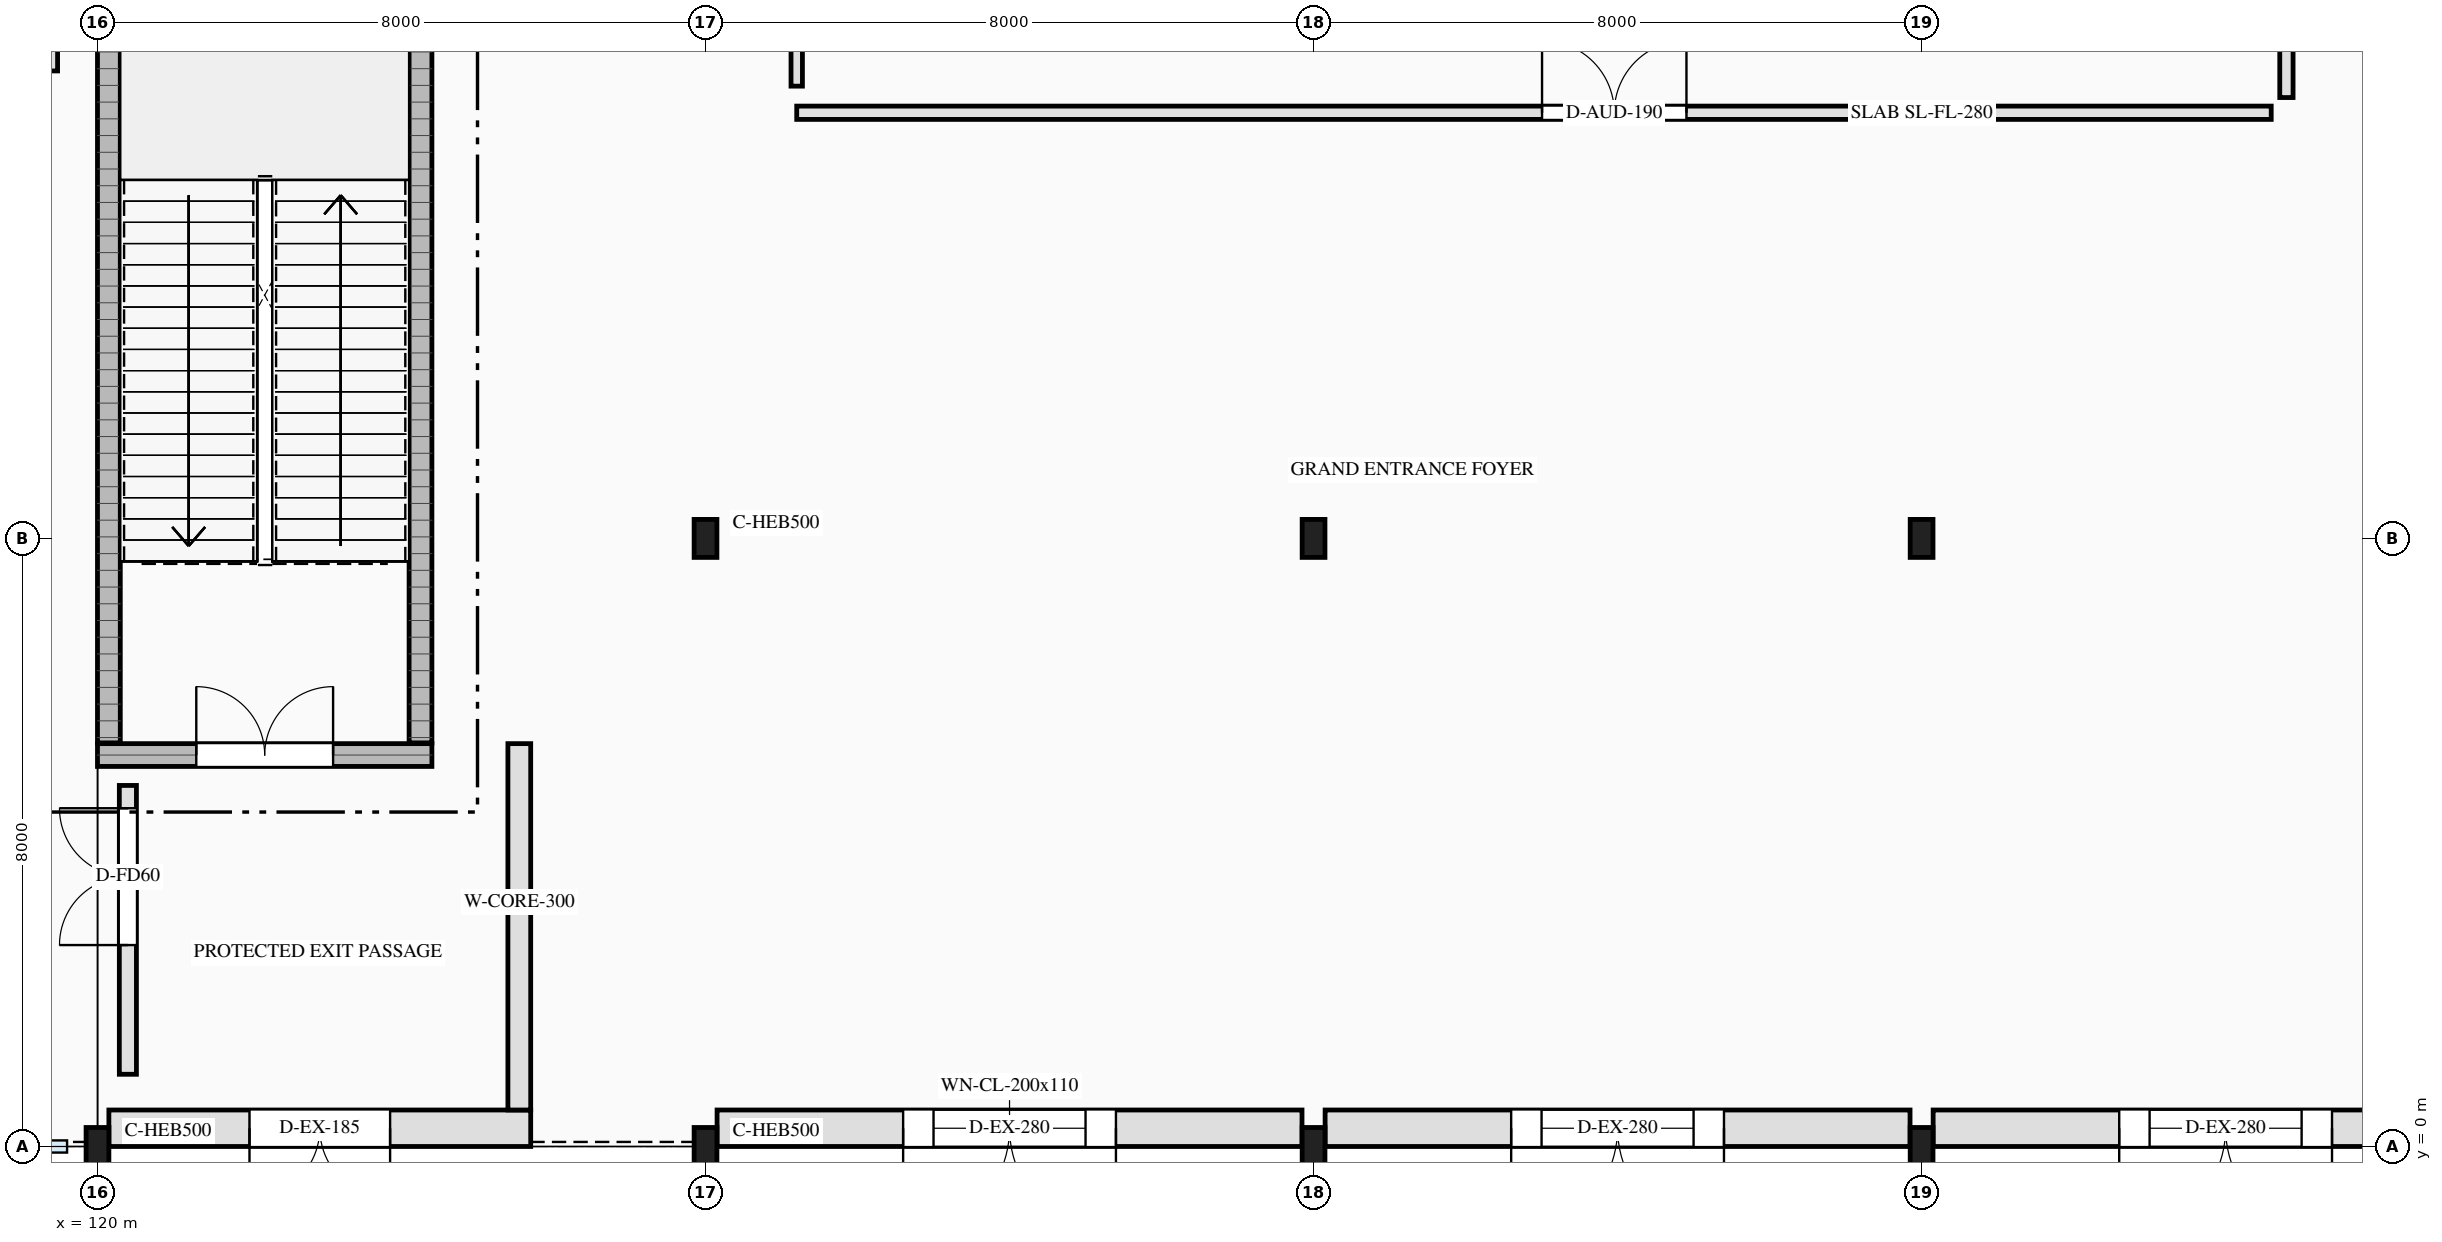
"""IFC4 building model, lengths in metres.
Left out: names, types, materials, properties, quantities, classifications, styles, units other than length and angle.
Written with IfcOpenShell. Run it as: python <this file> out.ifc"""

import sys

from ifc_helpers import new_model, si_unit, direction, frame, frame_2d, origin, origin_2d, place, context, subcontext, project, spatial, rectangle, i_section, extrude, element, fill, save


model = new_model("IFC4")
c1 = context("Model", 3, precision=1e-05, world=origin(), true_north=direction((0.0, 1.0)))
c2 = subcontext(c1, "Body", "Model", "MODEL_VIEW")
j1 = project(units=[si_unit("LENGTHUNIT", "METRE"), si_unit("PLANEANGLEUNIT", "RADIAN")], contexts=[c1])
p1 = place(None, origin())
s1 = spatial("IfcSite", under=j1, at=p1, CompositionType="ELEMENT")
p2 = place(p1, origin())
s2 = spatial("IfcBuilding", under=s1, at=p2, CompositionType="ELEMENT")
p3 = place(p2, origin())
s3 = spatial("IfcBuildingStorey", under=s2, at=p3, CompositionType="ELEMENT", Elevation=0.0)
p4 = place(p3, frame((120.0, 5.15, 0.0), z_axis=(0.0, 0.0, 1.0), x_axis=(1.0, 0.0, 0.0)))
e1 = element("IfcWall", 1, at=p4, inside=s3, PredefinedType="SHEAR", context=c2, shape_type="SweptSolid", body=[
    extrude(rectangle(XDim=4.4, YDim=0.3, at=frame_2d((2.2, 0.0))), origin(), (0.0, 0.0, 1.0), 5.4),
])
p5 = place(p4, frame((1.3, 0.0, 0.0)))
e2 = element("IfcOpeningElement", 2, at=p5, cuts=e1, PredefinedType="OPENING", context=c2, shape_type="SweptSolid", body=[
    extrude(rectangle(XDim=1.8, YDim=2.2, at=frame_2d((0.9, 1.1))), frame((0.0, 0.16, 0.0), z_axis=(0.0, -1.0, 0.0), x_axis=(1.0, 0.0, 0.0)), (0.0, 0.0, 1.0), 0.32),
])
for number, where, z_axis, x_axis in (
    (3, (120.15, 5.31, 0.0), (0.0, 0.0, 1.0), (0.0, 1.0, 0.0)),
    (4, (124.25, 5.31, 0.0), (0.0, 0.0, 1.0), (0.0, 1.0, 0.0)),
):
    element("IfcWall", number, at=place(p3, frame(where, z_axis=z_axis, x_axis=x_axis)), inside=s3, PredefinedType="SHEAR", context=c2, shape_type="SweptSolid", body=[
        extrude(rectangle(XDim=9.38, YDim=0.3, at=frame_2d((4.69, 0.0))), origin(), (0.0, 0.0, 1.0), 5.4),
    ])
for number, where, z_axis, x_axis in (
    (5, (120.0, 0.0, 0.0), (0.0, 0.0, 1.0), (1.0, 0.0, 0.0)),
    (6, (128.0, 0.0, 0.0), (0.0, 0.0, 1.0), (1.0, 0.0, 0.0)),
    (7, (128.0, 8.0, 0.0), (0.0, 0.0, 1.0), (1.0, 0.0, 0.0)),
    (8, (136.0, 0.0, 0.0), (0.0, 0.0, 1.0), (1.0, 0.0, 0.0)),
    (9, (136.0, 8.0, 0.0), (0.0, 0.0, 1.0), (1.0, 0.0, 0.0)),
    (10, (144.0, 0.0, 0.0), (0.0, 0.0, 1.0), (1.0, 0.0, 0.0)),
    (11, (144.0, 8.0, 0.0), (0.0, 0.0, 1.0), (1.0, 0.0, 0.0)),
):
    element("IfcColumn", number, at=place(p3, frame(where, z_axis=z_axis, x_axis=x_axis)), inside=s3, PredefinedType="COLUMN", context=c2, shape_type="SweptSolid", body=[
        extrude(i_section(OverallWidth=0.3, OverallDepth=0.5, WebThickness=0.014, FlangeThickness=0.028, FilletRadius=0.027, at=origin_2d()), origin(), (0.0, 0.0, 1.0), 5.4),
    ])
p6 = place(p3, frame((125.7, 0.24, 0.0), z_axis=(0.0, 0.0, 1.0), x_axis=(-1.0, 0.0, 0.0)))
e12 = element("IfcWall", 12, at=p6, inside=s3, PredefinedType="SOLIDWALL", context=c2, shape_type="SweptSolid", body=[
    extrude(rectangle(XDim=5.55, YDim=0.48, at=frame_2d((2.775, 0.0))), origin(), (0.0, 0.0, 1.0), 4.815),
])
p7 = place(p6, frame((1.85, 0.0, 0.0)))
e13 = element("IfcOpeningElement", 13, at=p7, cuts=e12, PredefinedType="OPENING", context=c2, shape_type="SweptSolid", body=[
    extrude(rectangle(XDim=1.85, YDim=2.3, at=frame_2d((0.925, 1.15))), frame((0.0, 0.25, 0.0), z_axis=(0.0, -1.0, 0.0), x_axis=(1.0, 0.0, 0.0)), (0.0, 0.0, 1.0), 0.5),
])
p8 = place(p3, frame((125.55, 0.48, 0.0), z_axis=(0.0, 0.0, 1.0), x_axis=(0.0, 1.0, 0.0)))
e14 = element("IfcWall", 14, at=p8, inside=s3, PredefinedType="SHEAR", context=c2, shape_type="SweptSolid", body=[
    extrude(rectangle(XDim=4.82, YDim=0.3, at=frame_2d((2.41, 0.0))), origin(), (0.0, 0.0, 1.0), 5.16),
])
p9 = place(p3, frame((135.848, 0.24, 0.0), z_axis=(0.0, 0.0, 1.0), x_axis=(-1.0, 0.0, 0.0)))
e15 = element("IfcWall", 15, at=p9, inside=s3, PredefinedType="SOLIDWALL", context=c2, shape_type="SweptSolid", body=[
    extrude(rectangle(XDim=7.696, YDim=0.48, at=frame_2d((3.848, 0.0))), origin(), (0.0, 0.0, 1.0), 4.835),
])
p10 = place(p9, frame((2.448, 0.0, 0.0)))
e16 = element("IfcOpeningElement", 16, at=p10, cuts=e15, PredefinedType="OPENING", context=c2, shape_type="SweptSolid", body=[
    extrude(rectangle(XDim=2.8, YDim=3.1, at=frame_2d((1.4, 1.55))), frame((0.0, 0.25, 0.0), z_axis=(0.0, -1.0, 0.0), x_axis=(1.0, 0.0, 0.0)), (0.0, 0.0, 1.0), 0.5),
])
p11 = place(p9, frame((2.848, 0.0, 3.32)))
e17 = element("IfcOpeningElement", 17, at=p11, cuts=e15, PredefinedType="OPENING", context=c2, shape_type="SweptSolid", body=[
    extrude(rectangle(XDim=2.0, YDim=1.1, at=frame_2d((1.0, 0.55))), frame((0.0, 0.25, 0.0), z_axis=(0.0, -1.0, 0.0), x_axis=(1.0, 0.0, 0.0)), (0.0, 0.0, 1.0), 0.5),
])
p12 = place(p3, frame((143.848, 0.24, 0.0), z_axis=(0.0, 0.0, 1.0), x_axis=(-1.0, 0.0, 0.0)))
e18 = element("IfcWall", 18, at=p12, inside=s3, PredefinedType="SOLIDWALL", context=c2, shape_type="SweptSolid", body=[
    extrude(rectangle(XDim=7.696, YDim=0.48, at=frame_2d((3.848, 0.0))), origin(), (0.0, 0.0, 1.0), 4.835),
])
p13 = place(p12, frame((2.448, 0.0, 0.0)))
e19 = element("IfcOpeningElement", 19, at=p13, cuts=e18, PredefinedType="OPENING", context=c2, shape_type="SweptSolid", body=[
    extrude(rectangle(XDim=2.8, YDim=3.1, at=frame_2d((1.4, 1.55))), frame((0.0, 0.25, 0.0), z_axis=(0.0, -1.0, 0.0), x_axis=(1.0, 0.0, 0.0)), (0.0, 0.0, 1.0), 0.5),
])
p14 = place(p12, frame((2.848, 0.0, 3.32)))
e20 = element("IfcOpeningElement", 20, at=p14, cuts=e18, PredefinedType="OPENING", context=c2, shape_type="SweptSolid", body=[
    extrude(rectangle(XDim=2.0, YDim=1.1, at=frame_2d((1.0, 0.55))), frame((0.0, 0.25, 0.0), z_axis=(0.0, -1.0, 0.0), x_axis=(1.0, 0.0, 0.0)), (0.0, 0.0, 1.0), 0.5),
])
p15 = place(p3, frame((151.848, 0.24, 0.0), z_axis=(0.0, 0.0, 1.0), x_axis=(-1.0, 0.0, 0.0)))
e21 = element("IfcWall", 21, at=p15, inside=s3, PredefinedType="SOLIDWALL", context=c2, shape_type="SweptSolid", body=[
    extrude(rectangle(XDim=7.696, YDim=0.48, at=frame_2d((3.848, 0.0))), origin(), (0.0, 0.0, 1.0), 4.835),
])
p16 = place(p15, frame((2.448, 0.0, 0.0)))
e22 = element("IfcOpeningElement", 22, at=p16, cuts=e21, PredefinedType="OPENING", context=c2, shape_type="SweptSolid", body=[
    extrude(rectangle(XDim=2.8, YDim=3.1, at=frame_2d((1.4, 1.55))), frame((0.0, 0.25, 0.0), z_axis=(0.0, -1.0, 0.0), x_axis=(1.0, 0.0, 0.0)), (0.0, 0.0, 1.0), 0.5),
])
p17 = place(p15, frame((2.848, 0.0, 3.32)))
e23 = element("IfcOpeningElement", 23, at=p17, cuts=e21, PredefinedType="OPENING", context=c2, shape_type="SweptSolid", body=[
    extrude(rectangle(XDim=2.0, YDim=1.1, at=frame_2d((1.0, 0.55))), frame((0.0, 0.25, 0.0), z_axis=(0.0, -1.0, 0.0), x_axis=(1.0, 0.0, 0.0)), (0.0, 0.0, 1.0), 0.5),
])
p18 = place(p3, frame((129.2, 13.6, 0.0), z_axis=(0.0, 0.0, 1.0), x_axis=(1.0, 0.0, 0.0)))
e24 = element("IfcWall", 24, at=p18, inside=s3, PredefinedType="PARTITIONING", context=c2, shape_type="SweptSolid", body=[
    extrude(rectangle(XDim=19.4, YDim=0.175, at=frame_2d((9.7, 0.0))), origin(), (0.0, 0.0, 1.0), 5.16),
])
p19 = place(p18, frame((9.806, 0.0, 0.0)))
e25 = element("IfcOpeningElement", 25, at=p19, cuts=e24, PredefinedType="OPENING", context=c2, shape_type="SweptSolid", body=[
    extrude(rectangle(XDim=1.9, YDim=2.35, at=frame_2d((0.95, 1.175))), frame((0.0, 0.097, 0.0), z_axis=(0.0, -1.0, 0.0), x_axis=(1.0, 0.0, 0.0)), (0.0, 0.0, 1.0), 0.195),
])
p20 = place(p3, frame((148.8, 13.8, 0.0), z_axis=(0.0, 0.0, 1.0), x_axis=(0.0, 1.0, 0.0)))
e26 = element("IfcWall", 26, at=p20, inside=s3, PredefinedType="PARTITIONING", context=c2, shape_type="SweptSolid", body=[
    extrude(rectangle(XDim=22.0, YDim=0.175, at=frame_2d((11.0, 0.0))), origin(), (0.0, 0.0, 1.0), 5.16),
])
p21 = place(p20, frame((5.264, 0.0, 0.0)))
e27 = element("IfcOpeningElement", 27, at=p21, cuts=e26, PredefinedType="OPENING", context=c2, shape_type="SweptSolid", body=[
    extrude(rectangle(XDim=1.9, YDim=2.35, at=frame_2d((0.95, 1.175))), frame((0.0, 0.097, 0.0), z_axis=(0.0, -1.0, 0.0), x_axis=(1.0, 0.0, 0.0)), (0.0, 0.0, 1.0), 0.195),
])
p22 = place(p3, frame((120.4, 0.95, 0.0), z_axis=(0.0, 0.0, 1.0), x_axis=(0.0, 1.0, 0.0)))
e28 = element("IfcWall", 28, at=p22, inside=s3, PredefinedType="SOLIDWALL", context=c2, shape_type="SweptSolid", body=[
    extrude(rectangle(XDim=3.8, YDim=0.225, at=frame_2d((1.9, 0.0))), origin(), (0.0, 0.0, 1.0), 5.16),
])
p23 = place(p22, frame((1.7, 0.0, 0.0)))
e29 = element("IfcOpeningElement", 29, at=p23, cuts=e28, PredefinedType="OPENING", context=c2, shape_type="SweptSolid", body=[
    extrude(rectangle(XDim=1.8, YDim=2.2, at=frame_2d((0.9, 1.1))), frame((0.0, 0.123, 0.0), z_axis=(0.0, -1.0, 0.0), x_axis=(1.0, 0.0, 0.0)), (0.0, 0.0, 1.0), 0.245),
])
p24 = place(p3, frame((129.2, 13.95, 0.0), z_axis=(0.0, 0.0, 1.0), x_axis=(0.0, 1.0, 0.0)))
e30 = element("IfcWall", 30, at=p24, inside=s3, PredefinedType="PARTITIONING", context=c2, shape_type="SweptSolid", body=[
    extrude(rectangle(XDim=21.7, YDim=0.15, at=frame_2d((10.85, 0.0))), origin(), (0.0, 0.0, 1.0), 5.16),
])
p25 = place(p3, frame((119.4, 14.15, 0.0), z_axis=(0.0, 0.0, 1.0), x_axis=(0.0, 1.0, 0.0)))
e31 = element("IfcWall", 31, at=p25, inside=s3, PredefinedType="PARTITIONING", context=c2, shape_type="SweptSolid", body=[
    extrude(rectangle(XDim=24.9, YDim=0.15, at=frame_2d((12.45, 0.0))), origin(), (0.0, 0.0, 1.0), 5.14),
])
p26 = place(p25, frame((13.012, 0.0, 0.0)))
e32 = element("IfcOpeningElement", 32, at=p26, cuts=e31, PredefinedType="OPENING", context=c2, shape_type="SweptSolid", body=[
    extrude(rectangle(XDim=1.7, YDim=2.45, at=frame_2d((0.85, 1.225))), frame((0.0, 0.085, 0.0), z_axis=(0.0, -1.0, 0.0), x_axis=(1.0, 0.0, 0.0)), (0.0, 0.0, 1.0), 0.17),
])
p27 = place(p7, origin())
e33 = element("IfcDoor", 33, at=p27, inside=s3, OperationType="DOUBLE_DOOR_SINGLE_SWING", PredefinedType="DOOR", context=c2, shape_type="SweptSolid", body=[
    extrude(rectangle(XDim=1.85, YDim=2.3, at=frame_2d((0.925, 1.15))), frame((0.0, 0.025, 0.0), z_axis=(0.0, -1.0, 0.0), x_axis=(1.0, 0.0, 0.0)), (0.0, 0.0, 1.0), 0.05),
])
fill(e13, e33)
p28 = place(p10, origin())
e34 = element("IfcDoor", 34, at=p28, inside=s3, OperationType="DOUBLE_DOOR_SINGLE_SWING", PredefinedType="DOOR", context=c2, shape_type="SweptSolid", body=[
    extrude(rectangle(XDim=2.8, YDim=3.1, at=frame_2d((1.4, 1.55))), frame((0.0, 0.025, 0.0), z_axis=(0.0, -1.0, 0.0), x_axis=(1.0, 0.0, 0.0)), (0.0, 0.0, 1.0), 0.05),
])
fill(e16, e34)
p29 = place(p11, origin())
e35 = element("IfcWindow", 35, at=p29, inside=s3, PartitioningType="DOUBLE_PANEL_HORIZONTAL", PredefinedType="WINDOW", context=c2, shape_type="SweptSolid", body=[
    extrude(rectangle(XDim=2.0, YDim=1.1, at=frame_2d((1.0, 0.55))), frame((0.0, 0.03, 0.0), z_axis=(0.0, -1.0, 0.0), x_axis=(1.0, 0.0, 0.0)), (0.0, 0.0, 1.0), 0.06),
])
fill(e17, e35)
p30 = place(p13, origin())
e36 = element("IfcDoor", 36, at=p30, inside=s3, OperationType="DOUBLE_DOOR_SINGLE_SWING", PredefinedType="DOOR", context=c2, shape_type="SweptSolid", body=[
    extrude(rectangle(XDim=2.8, YDim=3.1, at=frame_2d((1.4, 1.55))), frame((0.0, 0.025, 0.0), z_axis=(0.0, -1.0, 0.0), x_axis=(1.0, 0.0, 0.0)), (0.0, 0.0, 1.0), 0.05),
])
fill(e19, e36)
p31 = place(p14, origin())
e37 = element("IfcWindow", 37, at=p31, inside=s3, PartitioningType="DOUBLE_PANEL_HORIZONTAL", PredefinedType="WINDOW", context=c2, shape_type="SweptSolid", body=[
    extrude(rectangle(XDim=2.0, YDim=1.1, at=frame_2d((1.0, 0.55))), frame((0.0, 0.03, 0.0), z_axis=(0.0, -1.0, 0.0), x_axis=(1.0, 0.0, 0.0)), (0.0, 0.0, 1.0), 0.06),
])
fill(e20, e37)
p32 = place(p16, origin())
e38 = element("IfcDoor", 38, at=p32, inside=s3, OperationType="DOUBLE_DOOR_SINGLE_SWING", PredefinedType="DOOR", context=c2, shape_type="SweptSolid", body=[
    extrude(rectangle(XDim=2.8, YDim=3.1, at=frame_2d((1.4, 1.55))), frame((0.0, 0.025, 0.0), z_axis=(0.0, -1.0, 0.0), x_axis=(1.0, 0.0, 0.0)), (0.0, 0.0, 1.0), 0.05),
])
fill(e22, e38)
p33 = place(p17, origin())
e39 = element("IfcWindow", 39, at=p33, inside=s3, PartitioningType="DOUBLE_PANEL_HORIZONTAL", PredefinedType="WINDOW", context=c2, shape_type="SweptSolid", body=[
    extrude(rectangle(XDim=2.0, YDim=1.1, at=frame_2d((1.0, 0.55))), frame((0.0, 0.03, 0.0), z_axis=(0.0, -1.0, 0.0), x_axis=(1.0, 0.0, 0.0)), (0.0, 0.0, 1.0), 0.06),
])
fill(e23, e39)
p34 = place(p5, origin())
e40 = element("IfcDoor", 40, at=p34, inside=s3, OperationType="DOUBLE_DOOR_SINGLE_SWING", PredefinedType="DOOR", context=c2, shape_type="SweptSolid", body=[
    extrude(rectangle(XDim=1.8, YDim=2.2, at=frame_2d((0.9, 1.1))), frame((0.0, 0.025, 0.0), z_axis=(0.0, -1.0, 0.0), x_axis=(1.0, 0.0, 0.0)), (0.0, 0.0, 1.0), 0.05),
])
fill(e2, e40)
p35 = place(p19, origin())
e41 = element("IfcDoor", 41, at=p35, inside=s3, OperationType="DOUBLE_DOOR_SINGLE_SWING", PredefinedType="DOOR", context=c2, shape_type="SweptSolid", body=[
    extrude(rectangle(XDim=1.9, YDim=2.35, at=frame_2d((0.95, 1.175))), frame((0.0, 0.025, 0.0), z_axis=(0.0, -1.0, 0.0), x_axis=(1.0, 0.0, 0.0)), (0.0, 0.0, 1.0), 0.05),
])
fill(e25, e41)
p36 = place(p23, origin())
e42 = element("IfcDoor", 42, at=p36, inside=s3, OperationType="DOUBLE_DOOR_SINGLE_SWING", PredefinedType="DOOR", context=c2, shape_type="SweptSolid", body=[
    extrude(rectangle(XDim=1.8, YDim=2.2, at=frame_2d((0.9, 1.1))), frame((0.0, 0.025, 0.0), z_axis=(0.0, -1.0, 0.0), x_axis=(1.0, 0.0, 0.0)), (0.0, 0.0, 1.0), 0.05),
])
fill(e29, e42)
save(model, sys.argv[1])
